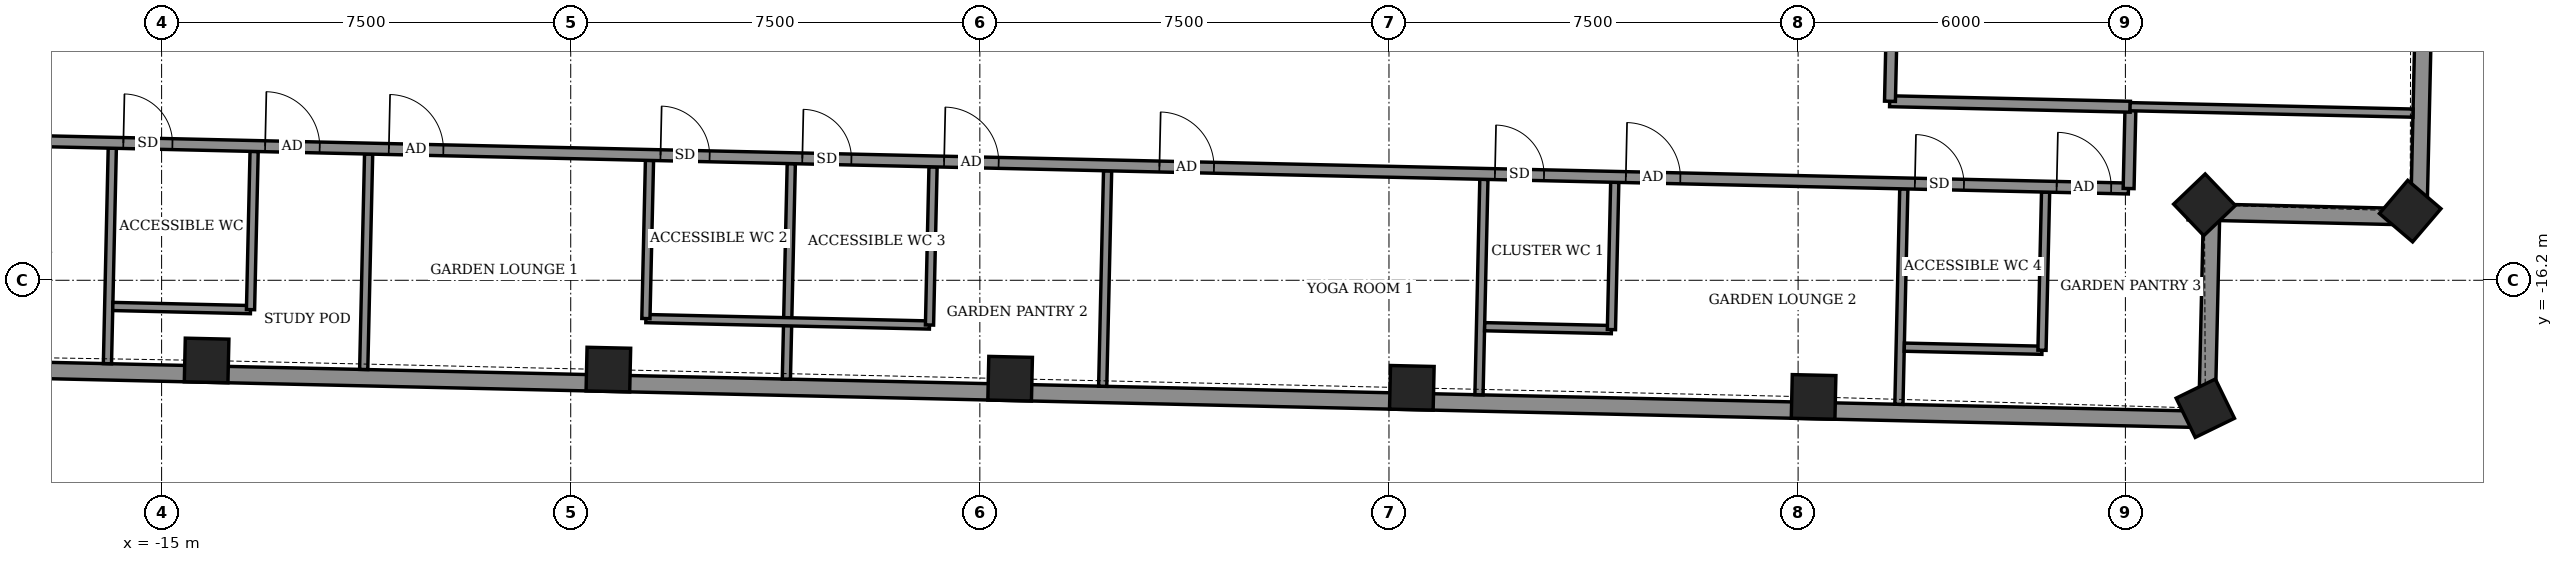
"""IFC4 building model, lengths in metres.
Left out: names, types, materials, properties, quantities, classifications, styles, units other than length and angle.
Written with IfcOpenShell. Run it as: python <this file> out.ifc"""

import sys

from ifc_helpers import new_model, si_unit, direction, frame, frame_2d, origin, origin_2d, place, context, subcontext, project, spatial, rectangle, extrude, element, fill, save


model = new_model("IFC4")
c1 = context("Model", 3, precision=1e-05, world=origin(), true_north=direction((0.0, 1.0)))
c2 = subcontext(c1, "Body", "Model", "MODEL_VIEW")
j1 = project(units=[si_unit("LENGTHUNIT", "METRE"), si_unit("PLANEANGLEUNIT", "RADIAN")], contexts=[c1])
p1 = place(None, origin())
s1 = spatial("IfcSite", under=j1, at=p1, CompositionType="ELEMENT")
p2 = place(p1, origin())
s2 = spatial("IfcBuilding", under=s1, at=p2, CompositionType="ELEMENT")
p3 = place(p2, frame((0.0, 0.0, 342.5)))
s3 = spatial("IfcBuildingStorey", under=s2, at=p3, CompositionType="ELEMENT", Elevation=342.5)
for number, where, z_axis, x_axis in (
    (1, (-14.175, -17.67, -0.55), (0.0, 0.0, 1.0), (1.0, -0.023, 0.0)),
    (2, (-6.81, -17.837, -0.55), (0.0, 0.0, 1.0), (1.0, -0.023, 0.0)),
    (3, (0.555, -18.004, -0.55), (0.0, 0.0, 1.0), (1.0, -0.023, 0.0)),
    (4, (7.919, -18.171, -0.55), (0.0, 0.0, 1.0), (1.0, -0.023, 0.0)),
    (5, (15.284, -18.338, -0.55), (0.0, 0.0, 1.0), (1.0, -0.023, 0.0)),
    (6, (22.465, -18.545, -0.55), (0.0, 0.0, 1.0), (0.899, 0.438, 0.0)),
    (7, (22.45, -14.817, -0.55), (0.0, 0.0, 1.0), (0.723, 0.691, 0.0)),
    (8, (26.221, -14.932, -0.55), (0.0, 0.0, 1.0), (0.649, 0.761, 0.0)),
):
    element("IfcColumn", number, at=place(p3, frame(where, z_axis=z_axis, x_axis=x_axis)), inside=s3, PredefinedType="COLUMN", context=c2, shape_type="SweptSolid", body=[
        extrude(rectangle(XDim=0.8, YDim=0.8, at=origin_2d()), origin(), (0.0, 0.0, 1.0), 3.6),
    ])
p4 = place(p3, frame((26.379, -15.039, 0.0), z_axis=(0.0, 0.0, 1.0), x_axis=(0.022668695782, 0.9997430321, 0.0)))
e9 = element("IfcWall", 9, at=p4, inside=s3, PredefinedType="SOLIDWALL", context=c2, shape_type="SweptSolid", body=[
    extrude(rectangle(XDim=9.574, YDim=0.3, at=frame_2d((4.787, 0.0))), origin(), (0.0, 0.0, 1.0), 2.55),
])
p5 = place(p3, frame((-21.395, -17.756, 0.0), z_axis=(0.0, 0.0, 1.0), x_axis=(0.999742664636, -0.022684895998, 0.0)))
e10 = element("IfcWall", 10, at=p5, inside=s3, PredefinedType="SOLIDWALL", context=c2, shape_type="SweptSolid", body=[
    extrude(rectangle(XDim=43.899, YDim=0.3, at=frame_2d((21.95, 0.0))), origin(), (0.0, 0.0, 1.0), 2.5),
])
p6 = place(p3, frame((22.493, -18.752, 0.0), z_axis=(0.0, 0.0, 1.0), x_axis=(0.022935935123, 0.999736936839, 0.0)))
e11 = element("IfcWall", 11, at=p6, inside=s3, PredefinedType="SOLIDWALL", context=c2, shape_type="SweptSolid", body=[
    extrude(rectangle(XDim=3.8, YDim=0.3, at=frame_2d((1.9, 0.0))), origin(), (0.0, 0.0, 1.0), 2.55),
])
p7 = place(p3, frame((22.152, -14.943, 0.0), z_axis=(0.0, 0.0, 1.0), x_axis=(0.99974246121, -0.022693859369, 0.0)))
e12 = element("IfcWall", 12, at=p7, inside=s3, PredefinedType="SOLIDWALL", context=c2, shape_type="SweptSolid", body=[
    extrude(rectangle(XDim=4.228, YDim=0.3, at=frame_2d((2.114, 0.0))), origin(), (0.0, 0.0, 1.0), 2.55),
])
p8 = place(p3, frame((-15.993, -17.729, 0.0), z_axis=(0.0, 0.0, 1.0), x_axis=(0.022492608405, 0.999747009281, 0.0)))
e13 = element("IfcWall", 13, at=p8, inside=s3, PredefinedType="PARTITIONING", context=c2, shape_type="SweptSolid", body=[
    extrude(rectangle(XDim=3.951, YDim=0.15, at=frame_2d((1.976, 0.0))), origin(), (0.0, 0.0, 1.0), 2.5),
])
for number, where, z_axis, x_axis in (
    (14, (-11.295, -17.835, 0.0), (0.0, 0.0, 1.0), (0.023, 1.0, 0.0)),
    (15, (-3.547, -18.011, 0.0), (0.0, 0.0, 1.0), (0.023, 1.0, 0.0)),
    (16, (2.252, -18.143, 0.0), (0.0, 0.0, 1.0), (0.023, 1.0, 0.0)),
    (17, (9.15, -18.299, 0.0), (0.0, 0.0, 1.0), (0.023, 1.0, 0.0)),
):
    element("IfcWall", number, at=place(p3, frame(where, z_axis=z_axis, x_axis=x_axis)), inside=s3, PredefinedType="PARTITIONING", context=c2, shape_type="SweptSolid", body=[
        extrude(rectangle(XDim=3.95, YDim=0.15, at=frame_2d((1.975, 0.0))), origin(), (0.0, 0.0, 1.0), 2.5),
    ])
p9 = place(p3, frame((16.848, -18.474, 0.0), z_axis=(0.0, 0.0, 1.0), x_axis=(0.022805639811, 0.999739917575, 0.0)))
e18 = element("IfcWall", 18, at=p9, inside=s3, PredefinedType="PARTITIONING", context=c2, shape_type="SweptSolid", body=[
    extrude(rectangle(XDim=3.95, YDim=0.15, at=frame_2d((1.975, 0.0))), origin(), (0.0, 0.0, 1.0), 2.5),
])
p10 = place(p3, frame((-15.895, -16.68, 0.0), z_axis=(0.0, 0.0, 1.0), x_axis=(0.999735307039, -0.023006865507, 0.0)))
e19 = element("IfcWall", 19, at=p10, inside=s3, PredefinedType="PARTITIONING", context=c2, shape_type="SweptSolid", body=[
    extrude(rectangle(XDim=2.526, YDim=0.15, at=frame_2d((1.263, 0.0))), origin(), (0.0, 0.0, 1.0), 3.05),
])
p11 = place(p3, frame((-13.37, -16.738, 0.0), z_axis=(0.0, 0.0, 1.0), x_axis=(0.022807433839, 0.999739876649, 0.0)))
e20 = element("IfcWall", 20, at=p11, inside=s3, PredefinedType="PARTITIONING", context=c2, shape_type="SweptSolid", body=[
    extrude(rectangle(XDim=2.901, YDim=0.15, at=frame_2d((1.45, 0.0))), origin(), (0.0, 0.0, 1.0), 3.05),
])
p12 = place(p3, frame((-6.122, -16.902, 0.0), z_axis=(0.0, 0.0, 1.0), x_axis=(0.99974287669, -0.022675548694, 0.0)))
e21 = element("IfcWall", 21, at=p12, inside=s3, PredefinedType="PARTITIONING", context=c2, shape_type="SweptSolid", body=[
    extrude(rectangle(XDim=5.2, YDim=0.15, at=frame_2d((2.6, 0.0))), origin(), (0.0, 0.0, 1.0), 3.05),
])
p13 = place(p3, frame((-6.122, -16.902, 0.0), z_axis=(0.0, 0.0, 1.0), x_axis=(0.022815112345, 0.999739701447, 0.0)))
e22 = element("IfcWall", 22, at=p13, inside=s3, PredefinedType="PARTITIONING", context=c2, shape_type="SweptSolid", body=[
    extrude(rectangle(XDim=2.9, YDim=0.15, at=frame_2d((1.45, 0.0))), origin(), (0.0, 0.0, 1.0), 3.05),
])
p14 = place(p3, frame((-0.923, -17.02, 0.0), z_axis=(0.0, 0.0, 1.0), x_axis=(0.022480421481, 0.999747283392, 0.0)))
e23 = element("IfcWall", 23, at=p14, inside=s3, PredefinedType="PARTITIONING", context=c2, shape_type="SweptSolid", body=[
    extrude(rectangle(XDim=2.9, YDim=0.15, at=frame_2d((1.45, 0.0))), origin(), (0.0, 0.0, 1.0), 3.05),
])
p15 = place(p3, frame((16.947, -17.426, 0.0), z_axis=(0.0, 0.0, 1.0), x_axis=(0.9997461113, -0.022532486354, 0.0)))
e24 = element("IfcWall", 24, at=p15, inside=s3, PredefinedType="PARTITIONING", context=c2, shape_type="SweptSolid", body=[
    extrude(rectangle(XDim=2.525, YDim=0.15, at=frame_2d((1.262, 0.0))), origin(), (0.0, 0.0, 1.0), 3.05),
])
p16 = place(p3, frame((19.471, -17.483, 0.0), z_axis=(0.0, 0.0, 1.0), x_axis=(0.022817032779, 0.999739657619, 0.0)))
e25 = element("IfcWall", 25, at=p16, inside=s3, PredefinedType="PARTITIONING", context=c2, shape_type="SweptSolid", body=[
    extrude(rectangle(XDim=2.9, YDim=0.15, at=frame_2d((1.45, 0.0))), origin(), (0.0, 0.0, 1.0), 3.05),
])
p17 = place(p3, frame((9.254, -17.051, 0.0), z_axis=(0.0, 0.0, 1.0), x_axis=(0.999740260747, -0.02279059109, 0.0)))
e26 = element("IfcWall", 26, at=p17, inside=s3, PredefinedType="PARTITIONING", context=c2, shape_type="SweptSolid", body=[
    extrude(rectangle(XDim=2.324, YDim=0.15, at=frame_2d((1.162, 0.0))), origin(), (0.0, 0.0, 1.0), 3.05),
])
p18 = place(p3, frame((11.578, -17.104, 0.0), z_axis=(0.0, 0.0, 1.0), x_axis=(0.022600248254, 0.99974458177, 0.0)))
e27 = element("IfcWall", 27, at=p18, inside=s3, PredefinedType="PARTITIONING", context=c2, shape_type="SweptSolid", body=[
    extrude(rectangle(XDim=2.701, YDim=0.15, at=frame_2d((1.35, 0.0))), origin(), (0.0, 0.0, 1.0), 3.05),
])
p19 = place(p3, frame((-19.768, -13.592, 0.0), z_axis=(0.0, 0.0, 1.0), x_axis=(0.999742831561, -0.02267753826, 0.0)))
e28 = element("IfcWall", 28, at=p19, inside=s3, PredefinedType="PARTITIONING", context=c2, shape_type="SweptSolid", body=[
    extrude(rectangle(XDim=40.834, YDim=0.2, at=frame_2d((20.417, 0.0))), origin(), (0.0, 0.0, 1.0), 3.05),
])
p20 = place(p19, frame((0.2, 0.0, 0.0)))
e29 = element("IfcOpeningElement", 29, at=p20, cuts=e28, PredefinedType="OPENING", context=c2, shape_type="SweptSolid", body=[
    extrude(rectangle(XDim=1.0, YDim=2.1, at=frame_2d((0.5, 1.05))), frame((0.0, 0.11, 0.0), z_axis=(0.0, -1.0, 0.0), x_axis=(1.0, 0.0, 0.0)), (0.0, 0.0, 1.0), 0.22),
])
p21 = place(p19, frame((6.668, 0.0, 0.0)))
e30 = element("IfcOpeningElement", 30, at=p21, cuts=e28, PredefinedType="OPENING", context=c2, shape_type="SweptSolid", body=[
    extrude(rectangle(XDim=1.0, YDim=2.1, at=frame_2d((0.5, 1.05))), frame((0.0, 0.11, 0.0), z_axis=(0.0, -1.0, 0.0), x_axis=(1.0, 0.0, 0.0)), (0.0, 0.0, 1.0), 0.22),
])
p22 = place(p19, frame((4.068, 0.0, 0.0)))
e31 = element("IfcOpeningElement", 31, at=p22, cuts=e28, PredefinedType="OPENING", context=c2, shape_type="SweptSolid", body=[
    extrude(rectangle(XDim=0.9, YDim=2.1, at=frame_2d((0.45, 1.05))), frame((0.0, 0.11, 0.0), z_axis=(0.0, -1.0, 0.0), x_axis=(1.0, 0.0, 0.0)), (0.0, 0.0, 1.0), 0.22),
])
p23 = place(p19, frame((8.936, 0.0, 0.0)))
e32 = element("IfcOpeningElement", 32, at=p23, cuts=e28, PredefinedType="OPENING", context=c2, shape_type="SweptSolid", body=[
    extrude(rectangle(XDim=1.0, YDim=2.1, at=frame_2d((0.5, 1.05))), frame((0.0, 0.11, 0.0), z_axis=(0.0, -1.0, 0.0), x_axis=(1.0, 0.0, 0.0)), (0.0, 0.0, 1.0), 0.22),
])
p24 = place(p19, frame((13.918, 0.0, 0.0)))
e33 = element("IfcOpeningElement", 33, at=p24, cuts=e28, PredefinedType="OPENING", context=c2, shape_type="SweptSolid", body=[
    extrude(rectangle(XDim=0.9, YDim=2.1, at=frame_2d((0.45, 1.05))), frame((0.0, 0.11, 0.0), z_axis=(0.0, -1.0, 0.0), x_axis=(1.0, 0.0, 0.0)), (0.0, 0.0, 1.0), 0.22),
])
p25 = place(p19, frame((19.118, 0.0, 0.0)))
e34 = element("IfcOpeningElement", 34, at=p25, cuts=e28, PredefinedType="OPENING", context=c2, shape_type="SweptSolid", body=[
    extrude(rectangle(XDim=1.0, YDim=2.1, at=frame_2d((0.5, 1.05))), frame((0.0, 0.11, 0.0), z_axis=(0.0, -1.0, 0.0), x_axis=(1.0, 0.0, 0.0)), (0.0, 0.0, 1.0), 0.22),
])
p26 = place(p19, frame((16.518, 0.0, 0.0)))
e35 = element("IfcOpeningElement", 35, at=p26, cuts=e28, PredefinedType="OPENING", context=c2, shape_type="SweptSolid", body=[
    extrude(rectangle(XDim=0.9, YDim=2.1, at=frame_2d((0.45, 1.05))), frame((0.0, 0.11, 0.0), z_axis=(0.0, -1.0, 0.0), x_axis=(1.0, 0.0, 0.0)), (0.0, 0.0, 1.0), 0.22),
])
p27 = place(p19, frame((23.066, 0.0, 0.0)))
e36 = element("IfcOpeningElement", 36, at=p27, cuts=e28, PredefinedType="OPENING", context=c2, shape_type="SweptSolid", body=[
    extrude(rectangle(XDim=1.0, YDim=2.1, at=frame_2d((0.5, 1.05))), frame((0.0, 0.11, 0.0), z_axis=(0.0, -1.0, 0.0), x_axis=(1.0, 0.0, 0.0)), (0.0, 0.0, 1.0), 0.22),
])
p28 = place(p19, frame((31.618, 0.0, 0.0)))
e37 = element("IfcOpeningElement", 37, at=p28, cuts=e28, PredefinedType="OPENING", context=c2, shape_type="SweptSolid", body=[
    extrude(rectangle(XDim=1.0, YDim=2.1, at=frame_2d((0.5, 1.05))), frame((0.0, 0.11, 0.0), z_axis=(0.0, -1.0, 0.0), x_axis=(1.0, 0.0, 0.0)), (0.0, 0.0, 1.0), 0.22),
])
p29 = place(p19, frame((29.218, 0.0, 0.0)))
e38 = element("IfcOpeningElement", 38, at=p29, cuts=e28, PredefinedType="OPENING", context=c2, shape_type="SweptSolid", body=[
    extrude(rectangle(XDim=0.9, YDim=2.1, at=frame_2d((0.45, 1.05))), frame((0.0, 0.11, 0.0), z_axis=(0.0, -1.0, 0.0), x_axis=(1.0, 0.0, 0.0)), (0.0, 0.0, 1.0), 0.22),
])
p30 = place(p19, frame((39.518, 0.0, 0.0)))
e39 = element("IfcOpeningElement", 39, at=p30, cuts=e28, PredefinedType="OPENING", context=c2, shape_type="SweptSolid", body=[
    extrude(rectangle(XDim=1.0, YDim=2.1, at=frame_2d((0.5, 1.05))), frame((0.0, 0.11, 0.0), z_axis=(0.0, -1.0, 0.0), x_axis=(1.0, 0.0, 0.0)), (0.0, 0.0, 1.0), 0.22),
])
p31 = place(p19, frame((36.918, 0.0, 0.0)))
e40 = element("IfcOpeningElement", 40, at=p31, cuts=e28, PredefinedType="OPENING", context=c2, shape_type="SweptSolid", body=[
    extrude(rectangle(XDim=0.9, YDim=2.1, at=frame_2d((0.45, 1.05))), frame((0.0, 0.11, 0.0), z_axis=(0.0, -1.0, 0.0), x_axis=(1.0, 0.0, 0.0)), (0.0, 0.0, 1.0), 0.22),
])
p32 = place(p3, frame((21.059, -14.518, 0.0), z_axis=(0.0, 0.0, 1.0), x_axis=(0.022632637625, 0.99974384905, 0.0)))
e41 = element("IfcWall", 41, at=p32, inside=s3, PredefinedType="PARTITIONING", context=c2, shape_type="SweptSolid", body=[
    extrude(rectangle(XDim=1.5, YDim=0.2, at=frame_2d((0.75, 0.0))), origin(), (0.0, 0.0, 1.0), 3.05),
])
p33 = place(p3, frame((-17.247, -12.149, 0.0), z_axis=(0.0, 0.0, 1.0), x_axis=(0.022696191528, 0.999742408268, 0.0)))
e42 = element("IfcWall", 42, at=p33, inside=s3, PredefinedType="PARTITIONING", context=c2, shape_type="SweptSolid", body=[
    extrude(rectangle(XDim=25.074, YDim=0.2, at=frame_2d((12.537, 0.0))), origin(), (0.0, 0.0, 1.0), 3.05),
])
p34 = place(p33, frame((18.022, 0.0, 0.0)))
e43 = element("IfcOpeningElement", 43, at=p34, cuts=e42, PredefinedType="OPENING", context=c2, shape_type="SweptSolid", body=[
    extrude(rectangle(XDim=1.0, YDim=2.1, at=frame_2d((0.5, 1.05))), frame((0.0, 0.11, 0.0), z_axis=(0.0, -1.0, 0.0), x_axis=(1.0, 0.0, 0.0)), (0.0, 0.0, 1.0), 0.22),
])
p35 = place(p33, frame((10.825, 0.0, 0.0)))
e44 = element("IfcOpeningElement", 44, at=p35, cuts=e42, PredefinedType="OPENING", context=c2, shape_type="SweptSolid", body=[
    extrude(rectangle(XDim=1.0, YDim=2.1, at=frame_2d((0.5, 1.05))), frame((0.0, 0.11, 0.0), z_axis=(0.0, -1.0, 0.0), x_axis=(1.0, 0.0, 0.0)), (0.0, 0.0, 1.0), 0.22),
])
p36 = place(p33, frame((6.075, 0.0, 0.0)))
e45 = element("IfcOpeningElement", 45, at=p36, cuts=e42, PredefinedType="OPENING", context=c2, shape_type="SweptSolid", body=[
    extrude(rectangle(XDim=1.0, YDim=2.1, at=frame_2d((0.5, 1.05))), frame((0.0, 0.11, 0.0), z_axis=(0.0, -1.0, 0.0), x_axis=(1.0, 0.0, 0.0)), (0.0, 0.0, 1.0), 0.22),
])
p37 = place(p33, frame((1.3, 0.0, 0.0)))
e46 = element("IfcOpeningElement", 46, at=p37, cuts=e42, PredefinedType="OPENING", context=c2, shape_type="SweptSolid", body=[
    extrude(rectangle(XDim=0.9, YDim=2.1, at=frame_2d((0.45, 1.05))), frame((0.0, 0.11, 0.0), z_axis=(0.0, -1.0, 0.0), x_axis=(1.0, 0.0, 0.0)), (0.0, 0.0, 1.0), 0.22),
])
p38 = place(p3, frame((16.679, -12.918, 0.0), z_axis=(0.0, 0.0, 1.0), x_axis=(0.999737590501, -0.022907425419, 0.0)))
e47 = element("IfcWall", 47, at=p38, inside=s3, PredefinedType="PARTITIONING", context=c2, shape_type="SweptSolid", body=[
    extrude(rectangle(XDim=4.412, YDim=0.2, at=frame_2d((2.206, 0.0))), origin(), (0.0, 0.0, 1.0), 3.05),
])
p39 = place(p3, frame((16.684, -12.919, 0.0), z_axis=(0.0, 0.0, 1.0), x_axis=(0.022667483124, 0.999743059595, 0.0)))
e48 = element("IfcWall", 48, at=p39, inside=s3, PredefinedType="PARTITIONING", context=c2, shape_type="SweptSolid", body=[
    extrude(rectangle(XDim=5.245, YDim=0.2, at=frame_2d((2.623, 0.0))), origin(), (0.0, 0.0, 1.0), 3.05),
])
p40 = place(p39, frame((1.051, 0.0, 0.0)))
e49 = element("IfcOpeningElement", 49, at=p40, cuts=e48, PredefinedType="OPENING", context=c2, shape_type="SweptSolid", body=[
    extrude(rectangle(XDim=1.0, YDim=2.1, at=frame_2d((0.5, 1.05))), frame((0.0, 0.11, 0.0), z_axis=(0.0, -1.0, 0.0), x_axis=(1.0, 0.0, 0.0)), (0.0, 0.0, 1.0), 0.22),
])
p41 = place(p3, frame((21.086, -13.018, 0.0), z_axis=(0.0, 0.0, 1.0), x_axis=(0.999741592512, -0.02273209628, 0.0)))
e50 = element("IfcWall", 50, at=p41, inside=s3, PredefinedType="PARTITIONING", context=c2, shape_type="SweptSolid", body=[
    extrude(rectangle(XDim=5.187, YDim=0.15, at=frame_2d((2.594, 0.0))), origin(), (0.0, 0.0, 1.0), 2.55),
])
p42 = place(p21, origin())
e51 = element("IfcDoor", 51, at=p42, inside=s3, OperationType="SINGLE_SWING_RIGHT", PredefinedType="DOOR", context=c2, shape_type="SweptSolid", body=[
    extrude(rectangle(XDim=1.0, YDim=2.1, at=frame_2d((0.5, 1.05))), frame((0.0, 0.025, 0.0), z_axis=(0.0, -1.0, 0.0), x_axis=(1.0, 0.0, 0.0)), (0.0, 0.0, 1.0), 0.05),
])
fill(e30, e51)
p43 = place(p22, origin())
e52 = element("IfcDoor", 52, at=p43, inside=s3, OperationType="SINGLE_SWING_LEFT", PredefinedType="DOOR", context=c2, shape_type="SweptSolid", body=[
    extrude(rectangle(XDim=0.9, YDim=2.1, at=frame_2d((0.45, 1.05))), frame((0.0, 0.025, 0.0), z_axis=(0.0, -1.0, 0.0), x_axis=(1.0, 0.0, 0.0)), (0.0, 0.0, 1.0), 0.05),
])
fill(e31, e52)
p44 = place(p23, origin())
e53 = element("IfcDoor", 53, at=p44, inside=s3, OperationType="SINGLE_SWING_LEFT", PredefinedType="DOOR", context=c2, shape_type="SweptSolid", body=[
    extrude(rectangle(XDim=1.0, YDim=2.1, at=frame_2d((0.5, 1.05))), frame((0.0, 0.025, 0.0), z_axis=(0.0, -1.0, 0.0), x_axis=(1.0, 0.0, 0.0)), (0.0, 0.0, 1.0), 0.05),
])
fill(e32, e53)
p45 = place(p24, origin())
e54 = element("IfcDoor", 54, at=p45, inside=s3, OperationType="SINGLE_SWING_RIGHT", PredefinedType="DOOR", context=c2, shape_type="SweptSolid", body=[
    extrude(rectangle(XDim=0.9, YDim=2.1, at=frame_2d((0.45, 1.05))), frame((0.0, 0.025, 0.0), z_axis=(0.0, -1.0, 0.0), x_axis=(1.0, 0.0, 0.0)), (0.0, 0.0, 1.0), 0.05),
])
fill(e33, e54)
p46 = place(p25, origin())
e55 = element("IfcDoor", 55, at=p46, inside=s3, OperationType="SINGLE_SWING_RIGHT", PredefinedType="DOOR", context=c2, shape_type="SweptSolid", body=[
    extrude(rectangle(XDim=1.0, YDim=2.1, at=frame_2d((0.5, 1.05))), frame((0.0, 0.025, 0.0), z_axis=(0.0, -1.0, 0.0), x_axis=(1.0, 0.0, 0.0)), (0.0, 0.0, 1.0), 0.05),
])
fill(e34, e55)
p47 = place(p26, origin())
e56 = element("IfcDoor", 56, at=p47, inside=s3, OperationType="SINGLE_SWING_LEFT", PredefinedType="DOOR", context=c2, shape_type="SweptSolid", body=[
    extrude(rectangle(XDim=0.9, YDim=2.1, at=frame_2d((0.45, 1.05))), frame((0.0, 0.025, 0.0), z_axis=(0.0, -1.0, 0.0), x_axis=(1.0, 0.0, 0.0)), (0.0, 0.0, 1.0), 0.05),
])
fill(e35, e56)
p48 = place(p27, origin())
e57 = element("IfcDoor", 57, at=p48, inside=s3, OperationType="SINGLE_SWING_LEFT", PredefinedType="DOOR", context=c2, shape_type="SweptSolid", body=[
    extrude(rectangle(XDim=1.0, YDim=2.1, at=frame_2d((0.5, 1.05))), frame((0.0, 0.025, 0.0), z_axis=(0.0, -1.0, 0.0), x_axis=(1.0, 0.0, 0.0)), (0.0, 0.0, 1.0), 0.05),
])
fill(e36, e57)
p49 = place(p28, origin())
e58 = element("IfcDoor", 58, at=p49, inside=s3, OperationType="SINGLE_SWING_RIGHT", PredefinedType="DOOR", context=c2, shape_type="SweptSolid", body=[
    extrude(rectangle(XDim=1.0, YDim=2.1, at=frame_2d((0.5, 1.05))), frame((0.0, 0.025, 0.0), z_axis=(0.0, -1.0, 0.0), x_axis=(1.0, 0.0, 0.0)), (0.0, 0.0, 1.0), 0.05),
])
fill(e37, e58)
p50 = place(p29, origin())
e59 = element("IfcDoor", 59, at=p50, inside=s3, OperationType="SINGLE_SWING_RIGHT", PredefinedType="DOOR", context=c2, shape_type="SweptSolid", body=[
    extrude(rectangle(XDim=0.9, YDim=2.1, at=frame_2d((0.45, 1.05))), frame((0.0, 0.025, 0.0), z_axis=(0.0, -1.0, 0.0), x_axis=(1.0, 0.0, 0.0)), (0.0, 0.0, 1.0), 0.05),
])
fill(e38, e59)
p51 = place(p30, origin())
e60 = element("IfcDoor", 60, at=p51, inside=s3, OperationType="SINGLE_SWING_LEFT", PredefinedType="DOOR", context=c2, shape_type="SweptSolid", body=[
    extrude(rectangle(XDim=1.0, YDim=2.1, at=frame_2d((0.5, 1.05))), frame((0.0, 0.025, 0.0), z_axis=(0.0, -1.0, 0.0), x_axis=(1.0, 0.0, 0.0)), (0.0, 0.0, 1.0), 0.05),
])
fill(e39, e60)
p52 = place(p31, origin())
e61 = element("IfcDoor", 61, at=p52, inside=s3, OperationType="SINGLE_SWING_LEFT", PredefinedType="DOOR", context=c2, shape_type="SweptSolid", body=[
    extrude(rectangle(XDim=0.9, YDim=2.1, at=frame_2d((0.45, 1.05))), frame((0.0, 0.025, 0.0), z_axis=(0.0, -1.0, 0.0), x_axis=(1.0, 0.0, 0.0)), (0.0, 0.0, 1.0), 0.05),
])
fill(e40, e61)
save(model, sys.argv[1])
